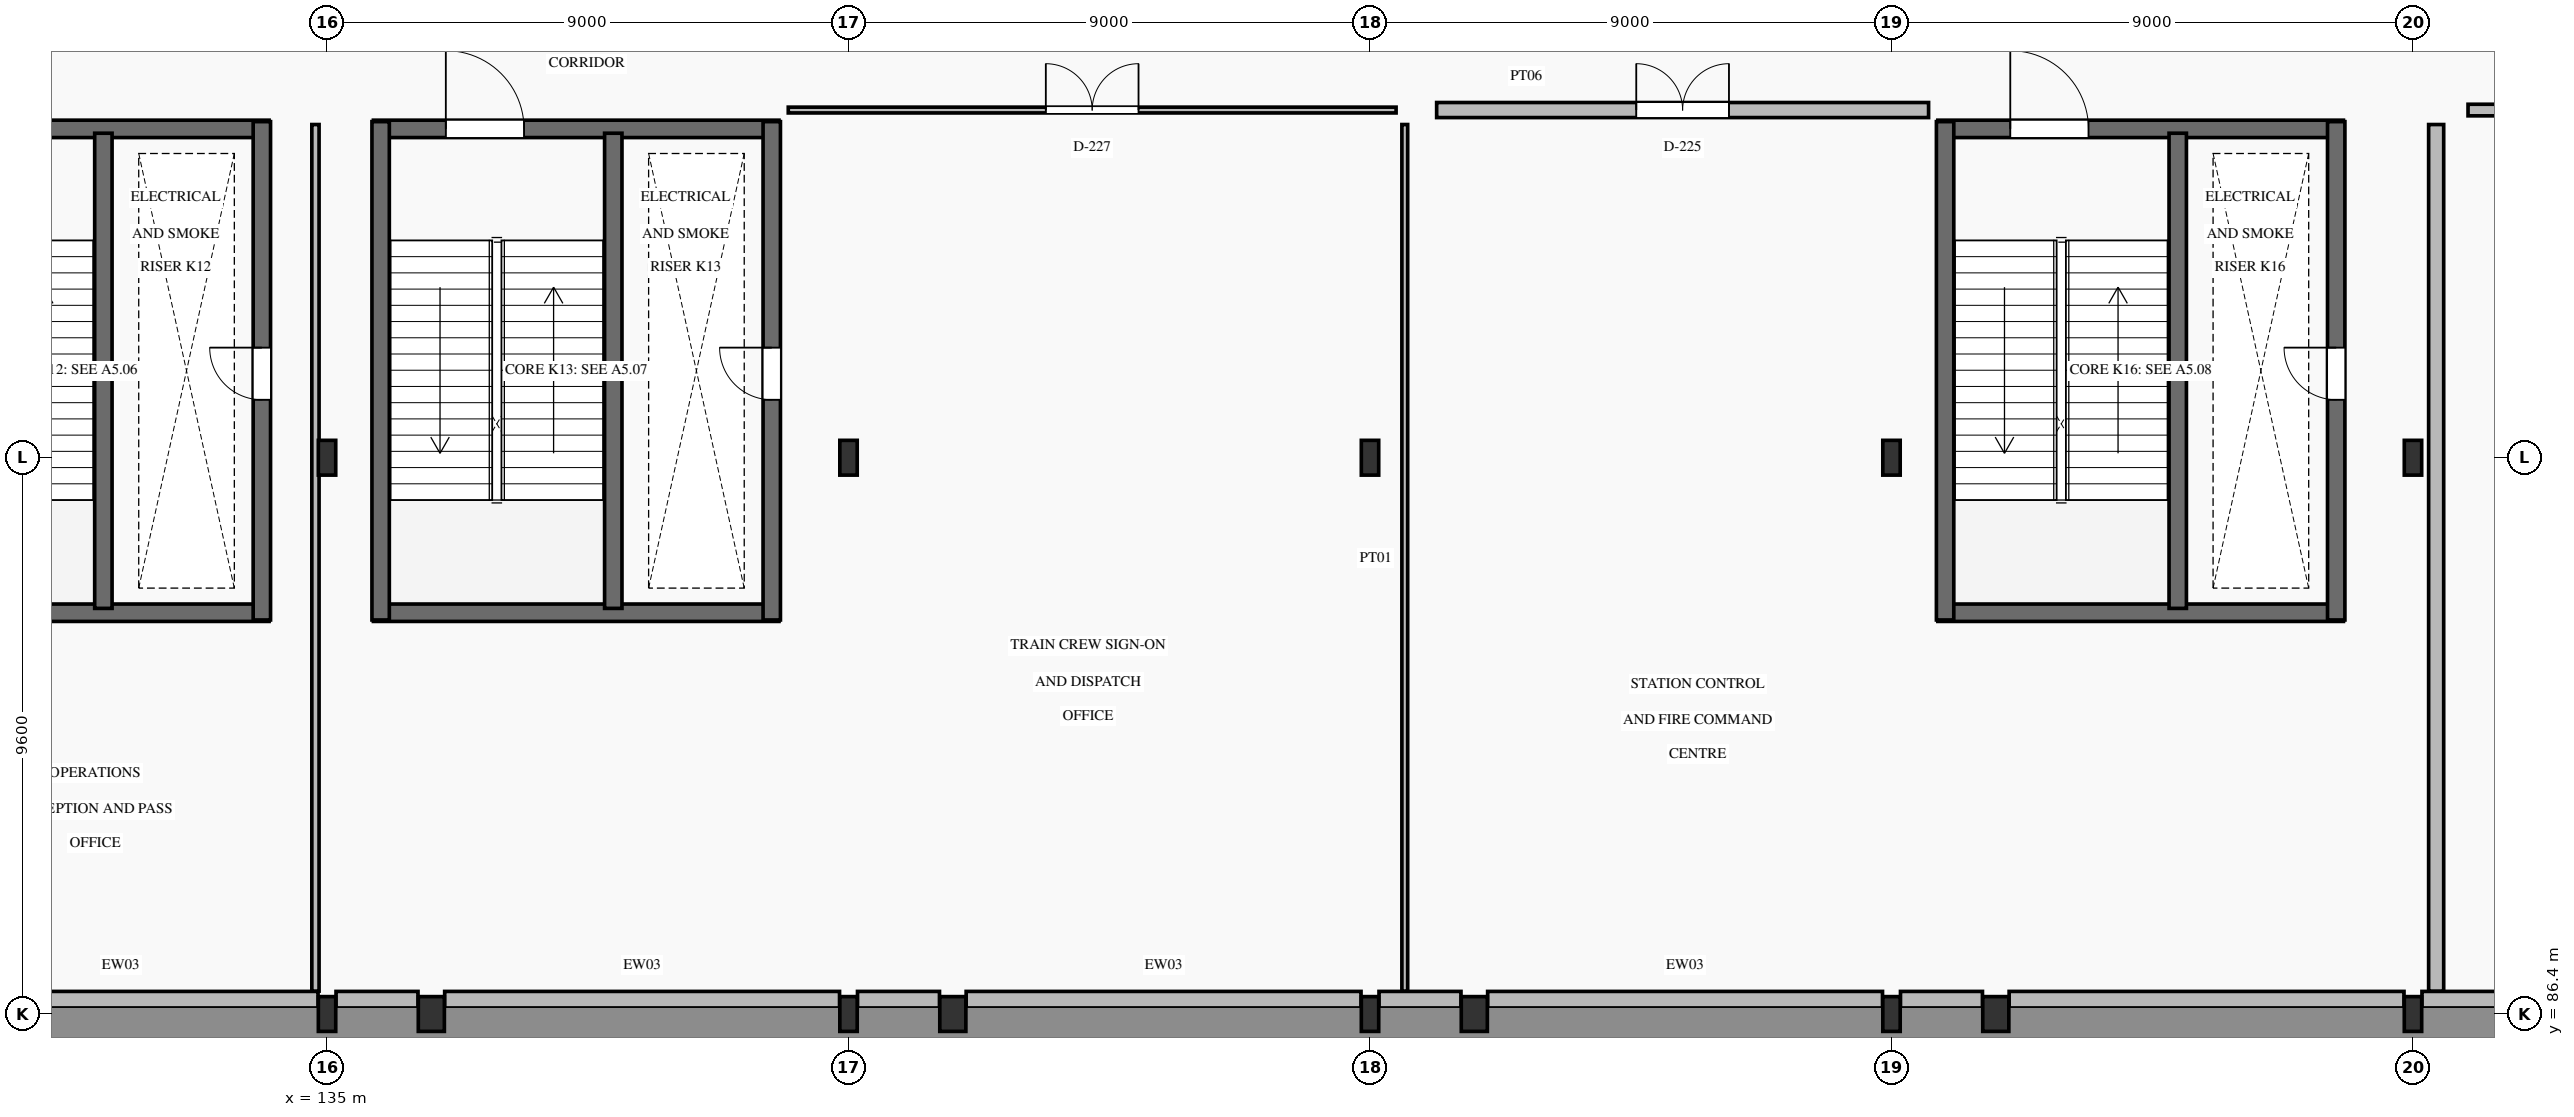
"""IFC4 building model, lengths in metres.
Left out: names, types, materials, properties, quantities, classifications, styles, units other than length and angle.
Written with IfcOpenShell. Run it as: python <this file> out.ifc"""

import sys

from ifc_helpers import new_model, si_unit, direction, frame, frame_2d, origin, origin_2d, place, context, subcontext, project, spatial, rectangle, i_section, extrude, element, fill, save


model = new_model("IFC4")
c1 = context("Model", 3, precision=1e-05, world=origin(), true_north=direction((0.0, 1.0)))
c2 = subcontext(c1, "Body", "Model", "MODEL_VIEW")
j1 = project(units=[si_unit("LENGTHUNIT", "METRE"), si_unit("PLANEANGLEUNIT", "RADIAN")], contexts=[c1])
p1 = place(None, origin())
s1 = spatial("IfcSite", under=j1, at=p1, CompositionType="ELEMENT")
p2 = place(p1, origin())
s2 = spatial("IfcBuilding", under=s1, at=p2, CompositionType="ELEMENT")
p3 = place(p2, origin())
s3 = spatial("IfcBuildingStorey", under=s2, at=p3, CompositionType="ELEMENT", Elevation=0.0)
for number, where, z_axis, x_axis in (
    (1, (135.0, 86.4, 0.0), (0.0, 0.0, 1.0), (1.0, 0.0, 0.0)),
    (2, (135.0, 96.0, 0.0), (0.0, 0.0, 1.0), (1.0, 0.0, 0.0)),
    (3, (144.0, 86.4, 0.0), (0.0, 0.0, 1.0), (1.0, 0.0, 0.0)),
    (4, (144.0, 96.0, 0.0), (0.0, 0.0, 1.0), (1.0, 0.0, 0.0)),
    (5, (153.0, 86.4, 0.0), (0.0, 0.0, 1.0), (1.0, 0.0, 0.0)),
    (6, (153.0, 96.0, 0.0), (0.0, 0.0, 1.0), (1.0, 0.0, 0.0)),
    (7, (162.0, 86.4, 0.0), (0.0, 0.0, 1.0), (1.0, 0.0, 0.0)),
    (8, (162.0, 96.0, 0.0), (0.0, 0.0, 1.0), (1.0, 0.0, 0.0)),
    (9, (171.0, 86.4, 0.0), (0.0, 0.0, 1.0), (1.0, 0.0, 0.0)),
    (10, (171.0, 96.0, 0.0), (0.0, 0.0, 1.0), (1.0, 0.0, 0.0)),
):
    element("IfcColumn", number, at=place(p3, frame(where, z_axis=z_axis, x_axis=x_axis)), inside=s3, PredefinedType="COLUMN", context=c2, shape_type="SweptSolid", body=[
        extrude(i_section(OverallWidth=0.3, OverallDepth=0.6, WebThickness=0.015, FlangeThickness=0.03, FilletRadius=0.027, at=origin_2d()), origin(), (0.0, 0.0, 1.0), 6.0),
    ])
for number, where, z_axis, x_axis in (
    (11, (136.8, 86.4, 0.0), (0.0, 0.0, 1.0), (1.0, 0.0, 0.0)),
    (12, (145.8, 86.4, 0.0), (0.0, 0.0, 1.0), (1.0, 0.0, 0.0)),
    (13, (154.8, 86.4, 0.0), (0.0, 0.0, 1.0), (1.0, 0.0, 0.0)),
    (14, (163.8, 86.4, 0.0), (0.0, 0.0, 1.0), (1.0, 0.0, 0.0)),
):
    element("IfcColumn", number, at=place(p3, frame(where, z_axis=z_axis, x_axis=x_axis)), inside=s3, PredefinedType="PILASTER", context=c2, shape_type="SweptSolid", body=[
        extrude(rectangle(XDim=0.45, YDim=0.6, at=origin_2d()), origin(), (0.0, 0.0, 1.0), 6.0),
    ])
p4 = place(p3, frame((128.03, 86.6, 0.0), z_axis=(0.0, 0.0, 1.0), x_axis=(1.0, 0.0, 0.0)))
e15 = element("IfcWall", 15, at=p4, inside=s3, PredefinedType="SOLIDWALL", context=c2, shape_type="SweptSolid", body=[
    extrude(rectangle(XDim=6.815, YDim=0.38, at=frame_2d((3.407, 0.0))), origin(), (0.0, 0.0, 1.0), 5.49),
])
p5 = place(p3, frame((135.155, 86.6, 0.0), z_axis=(0.0, 0.0, 1.0), x_axis=(1.0, 0.0, 0.0)))
e16 = element("IfcWall", 16, at=p5, inside=s3, PredefinedType="SOLIDWALL", context=c2, shape_type="SweptSolid", body=[
    extrude(rectangle(XDim=1.415, YDim=0.38, at=frame_2d((0.708, 0.0))), origin(), (0.0, 0.0, 1.0), 5.49),
])
p6 = place(p3, frame((137.03, 86.6, 0.0), z_axis=(0.0, 0.0, 1.0), x_axis=(1.0, 0.0, 0.0)))
e17 = element("IfcWall", 17, at=p6, inside=s3, PredefinedType="SOLIDWALL", context=c2, shape_type="SweptSolid", body=[
    extrude(rectangle(XDim=6.815, YDim=0.38, at=frame_2d((3.407, 0.0))), origin(), (0.0, 0.0, 1.0), 5.49),
])
p7 = place(p3, frame((144.155, 86.6, 0.0), z_axis=(0.0, 0.0, 1.0), x_axis=(1.0, 0.0, 0.0)))
e18 = element("IfcWall", 18, at=p7, inside=s3, PredefinedType="SOLIDWALL", context=c2, shape_type="SweptSolid", body=[
    extrude(rectangle(XDim=1.415, YDim=0.38, at=frame_2d((0.708, 0.0))), origin(), (0.0, 0.0, 1.0), 5.49),
])
p8 = place(p3, frame((146.03, 86.6, 0.0), z_axis=(0.0, 0.0, 1.0), x_axis=(1.0, 0.0, 0.0)))
e19 = element("IfcWall", 19, at=p8, inside=s3, PredefinedType="SOLIDWALL", context=c2, shape_type="SweptSolid", body=[
    extrude(rectangle(XDim=6.815, YDim=0.38, at=frame_2d((3.407, 0.0))), origin(), (0.0, 0.0, 1.0), 5.49),
])
p9 = place(p3, frame((153.155, 86.6, 0.0), z_axis=(0.0, 0.0, 1.0), x_axis=(1.0, 0.0, 0.0)))
e20 = element("IfcWall", 20, at=p9, inside=s3, PredefinedType="SOLIDWALL", context=c2, shape_type="SweptSolid", body=[
    extrude(rectangle(XDim=1.415, YDim=0.38, at=frame_2d((0.708, 0.0))), origin(), (0.0, 0.0, 1.0), 5.49),
])
p10 = place(p3, frame((155.03, 86.6, 0.0), z_axis=(0.0, 0.0, 1.0), x_axis=(1.0, 0.0, 0.0)))
e21 = element("IfcWall", 21, at=p10, inside=s3, PredefinedType="SOLIDWALL", context=c2, shape_type="SweptSolid", body=[
    extrude(rectangle(XDim=6.815, YDim=0.38, at=frame_2d((3.407, 0.0))), origin(), (0.0, 0.0, 1.0), 5.49),
])
p11 = place(p3, frame((162.155, 86.6, 0.0), z_axis=(0.0, 0.0, 1.0), x_axis=(1.0, 0.0, 0.0)))
e22 = element("IfcWall", 22, at=p11, inside=s3, PredefinedType="SOLIDWALL", context=c2, shape_type="SweptSolid", body=[
    extrude(rectangle(XDim=1.415, YDim=0.38, at=frame_2d((0.708, 0.0))), origin(), (0.0, 0.0, 1.0), 5.49),
])
p12 = place(p3, frame((164.03, 86.6, 0.0), z_axis=(0.0, 0.0, 1.0), x_axis=(1.0, 0.0, 0.0)))
e23 = element("IfcWall", 23, at=p12, inside=s3, PredefinedType="SOLIDWALL", context=c2, shape_type="SweptSolid", body=[
    extrude(rectangle(XDim=6.815, YDim=0.38, at=frame_2d((3.407, 0.0))), origin(), (0.0, 0.0, 1.0), 5.49),
])
p13 = place(p3, frame((171.155, 86.6, 0.0), z_axis=(0.0, 0.0, 1.0), x_axis=(1.0, 0.0, 0.0)))
e24 = element("IfcWall", 24, at=p13, inside=s3, PredefinedType="SOLIDWALL", context=c2, shape_type="SweptSolid", body=[
    extrude(rectangle(XDim=1.415, YDim=0.38, at=frame_2d((0.708, 0.0))), origin(), (0.0, 0.0, 1.0), 5.49),
])
p14 = place(p3, frame((127.0, 93.325, 0.0), z_axis=(0.0, 0.0, 1.0), x_axis=(1.0, 0.0, 0.0)))
e25 = element("IfcWall", 25, at=p14, inside=s3, PredefinedType="SHEAR", context=c2, shape_type="SweptSolid", body=[
    extrude(rectangle(XDim=7.0, YDim=0.3, at=frame_2d((3.5, 0.0))), origin(), (0.0, 0.0, 1.0), 6.0),
])
p15 = place(p3, frame((127.0, 101.675, 0.0), z_axis=(0.0, 0.0, 1.0), x_axis=(1.0, 0.0, 0.0)))
e26 = element("IfcWall", 26, at=p15, inside=s3, PredefinedType="SHEAR", context=c2, shape_type="SweptSolid", body=[
    extrude(rectangle(XDim=7.0, YDim=0.3, at=frame_2d((3.5, 0.0))), origin(), (0.0, 0.0, 1.0), 6.0),
])
p16 = place(p15, frame((1.25, 0.0, 0.0)))
e27 = element("IfcOpeningElement", 27, at=p16, cuts=e26, PredefinedType="OPENING", context=c2, shape_type="SweptSolid", body=[
    extrude(rectangle(XDim=1.35, YDim=2.2, at=frame_2d((0.675, 1.1))), frame((0.0, 0.165, 0.0), z_axis=(0.0, -1.0, 0.0), x_axis=(1.0, 0.0, 0.0)), (0.0, 0.0, 1.0), 0.33),
])
p17 = place(p3, frame((133.875, 93.2, 0.0), z_axis=(0.0, 0.0, 1.0), x_axis=(0.0, 1.0, 0.0)))
e28 = element("IfcWall", 28, at=p17, inside=s3, PredefinedType="SHEAR", context=c2, shape_type="SweptSolid", body=[
    extrude(rectangle(XDim=8.6, YDim=0.3, at=frame_2d((4.3, 0.0))), origin(), (0.0, 0.0, 1.0), 6.0),
])
p18 = place(p17, frame((3.8, 0.0, 0.0)))
e29 = element("IfcOpeningElement", 29, at=p18, cuts=e28, PredefinedType="OPENING", context=c2, shape_type="SweptSolid", body=[
    extrude(rectangle(XDim=0.9, YDim=2.05, at=frame_2d((0.45, 1.025))), frame((0.0, 0.165, 0.0), z_axis=(0.0, -1.0, 0.0), x_axis=(1.0, 0.0, 0.0)), (0.0, 0.0, 1.0), 0.33),
])
p19 = place(p3, frame((131.14, 93.4, 0.0), z_axis=(0.0, 0.0, 1.0), x_axis=(0.0, 1.0, 0.0)))
e30 = element("IfcWall", 30, at=p19, inside=s3, PredefinedType="SHEAR", context=c2, shape_type="SweptSolid", body=[
    extrude(rectangle(XDim=8.2, YDim=0.3, at=frame_2d((4.1, 0.0))), origin(), (0.0, 0.0, 1.0), 6.0),
])
p20 = place(p3, frame((135.8, 93.325, 0.0), z_axis=(0.0, 0.0, 1.0), x_axis=(1.0, 0.0, 0.0)))
e31 = element("IfcWall", 31, at=p20, inside=s3, PredefinedType="SHEAR", context=c2, shape_type="SweptSolid", body=[
    extrude(rectangle(XDim=7.0, YDim=0.3, at=frame_2d((3.5, 0.0))), origin(), (0.0, 0.0, 1.0), 6.0),
])
p21 = place(p3, frame((135.8, 101.675, 0.0), z_axis=(0.0, 0.0, 1.0), x_axis=(1.0, 0.0, 0.0)))
e32 = element("IfcWall", 32, at=p21, inside=s3, PredefinedType="SHEAR", context=c2, shape_type="SweptSolid", body=[
    extrude(rectangle(XDim=7.0, YDim=0.3, at=frame_2d((3.5, 0.0))), origin(), (0.0, 0.0, 1.0), 6.0),
])
p22 = place(p21, frame((1.25, 0.0, 0.0)))
e33 = element("IfcOpeningElement", 33, at=p22, cuts=e32, PredefinedType="OPENING", context=c2, shape_type="SweptSolid", body=[
    extrude(rectangle(XDim=1.35, YDim=2.2, at=frame_2d((0.675, 1.1))), frame((0.0, 0.165, 0.0), z_axis=(0.0, -1.0, 0.0), x_axis=(1.0, 0.0, 0.0)), (0.0, 0.0, 1.0), 0.33),
])
p23 = place(p3, frame((135.925, 93.2, 0.0), z_axis=(0.0, 0.0, 1.0), x_axis=(0.0, 1.0, 0.0)))
e34 = element("IfcWall", 34, at=p23, inside=s3, PredefinedType="SHEAR", context=c2, shape_type="SweptSolid", body=[
    extrude(rectangle(XDim=8.6, YDim=0.3, at=frame_2d((4.3, 0.0))), origin(), (0.0, 0.0, 1.0), 6.0),
])
p24 = place(p3, frame((142.675, 93.2, 0.0), z_axis=(0.0, 0.0, 1.0), x_axis=(0.0, 1.0, 0.0)))
e35 = element("IfcWall", 35, at=p24, inside=s3, PredefinedType="SHEAR", context=c2, shape_type="SweptSolid", body=[
    extrude(rectangle(XDim=8.6, YDim=0.3, at=frame_2d((4.3, 0.0))), origin(), (0.0, 0.0, 1.0), 6.0),
])
p25 = place(p24, frame((3.8, 0.0, 0.0)))
e36 = element("IfcOpeningElement", 36, at=p25, cuts=e35, PredefinedType="OPENING", context=c2, shape_type="SweptSolid", body=[
    extrude(rectangle(XDim=0.9, YDim=2.05, at=frame_2d((0.45, 1.025))), frame((0.0, 0.165, 0.0), z_axis=(0.0, -1.0, 0.0), x_axis=(1.0, 0.0, 0.0)), (0.0, 0.0, 1.0), 0.33),
])
p26 = place(p3, frame((139.94, 93.4, 0.0), z_axis=(0.0, 0.0, 1.0), x_axis=(0.0, 1.0, 0.0)))
e37 = element("IfcWall", 37, at=p26, inside=s3, PredefinedType="SHEAR", context=c2, shape_type="SweptSolid", body=[
    extrude(rectangle(XDim=8.2, YDim=0.3, at=frame_2d((4.1, 0.0))), origin(), (0.0, 0.0, 1.0), 6.0),
])
p27 = place(p3, frame((162.8, 93.325, 0.0), z_axis=(0.0, 0.0, 1.0), x_axis=(1.0, 0.0, 0.0)))
e38 = element("IfcWall", 38, at=p27, inside=s3, PredefinedType="SHEAR", context=c2, shape_type="SweptSolid", body=[
    extrude(rectangle(XDim=7.0, YDim=0.3, at=frame_2d((3.5, 0.0))), origin(), (0.0, 0.0, 1.0), 6.0),
])
p28 = place(p3, frame((162.8, 101.675, 0.0), z_axis=(0.0, 0.0, 1.0), x_axis=(1.0, 0.0, 0.0)))
e39 = element("IfcWall", 39, at=p28, inside=s3, PredefinedType="SHEAR", context=c2, shape_type="SweptSolid", body=[
    extrude(rectangle(XDim=7.0, YDim=0.3, at=frame_2d((3.5, 0.0))), origin(), (0.0, 0.0, 1.0), 6.0),
])
p29 = place(p28, frame((1.25, 0.0, 0.0)))
e40 = element("IfcOpeningElement", 40, at=p29, cuts=e39, PredefinedType="OPENING", context=c2, shape_type="SweptSolid", body=[
    extrude(rectangle(XDim=1.35, YDim=2.2, at=frame_2d((0.675, 1.1))), frame((0.0, 0.165, 0.0), z_axis=(0.0, -1.0, 0.0), x_axis=(1.0, 0.0, 0.0)), (0.0, 0.0, 1.0), 0.33),
])
p30 = place(p3, frame((162.925, 93.2, 0.0), z_axis=(0.0, 0.0, 1.0), x_axis=(0.0, 1.0, 0.0)))
e41 = element("IfcWall", 41, at=p30, inside=s3, PredefinedType="SHEAR", context=c2, shape_type="SweptSolid", body=[
    extrude(rectangle(XDim=8.6, YDim=0.3, at=frame_2d((4.3, 0.0))), origin(), (0.0, 0.0, 1.0), 6.0),
])
p31 = place(p3, frame((169.675, 93.2, 0.0), z_axis=(0.0, 0.0, 1.0), x_axis=(0.0, 1.0, 0.0)))
e42 = element("IfcWall", 42, at=p31, inside=s3, PredefinedType="SHEAR", context=c2, shape_type="SweptSolid", body=[
    extrude(rectangle(XDim=8.6, YDim=0.3, at=frame_2d((4.3, 0.0))), origin(), (0.0, 0.0, 1.0), 6.0),
])
p32 = place(p31, frame((3.8, 0.0, 0.0)))
e43 = element("IfcOpeningElement", 43, at=p32, cuts=e42, PredefinedType="OPENING", context=c2, shape_type="SweptSolid", body=[
    extrude(rectangle(XDim=0.9, YDim=2.05, at=frame_2d((0.45, 1.025))), frame((0.0, 0.165, 0.0), z_axis=(0.0, -1.0, 0.0), x_axis=(1.0, 0.0, 0.0)), (0.0, 0.0, 1.0), 0.33),
])
p33 = place(p3, frame((166.94, 93.4, 0.0), z_axis=(0.0, 0.0, 1.0), x_axis=(0.0, 1.0, 0.0)))
e44 = element("IfcWall", 44, at=p33, inside=s3, PredefinedType="SHEAR", context=c2, shape_type="SweptSolid", body=[
    extrude(rectangle(XDim=8.2, YDim=0.3, at=frame_2d((4.1, 0.0))), origin(), (0.0, 0.0, 1.0), 6.0),
])
p34 = place(p3, frame((154.15, 102.0, 0.0), z_axis=(0.0, 0.0, 1.0), x_axis=(1.0, 0.0, 0.0)))
e45 = element("IfcWall", 45, at=p34, inside=s3, PredefinedType="PARTITIONING", context=c2, shape_type="SweptSolid", body=[
    extrude(rectangle(XDim=8.49, YDim=0.26, at=frame_2d((4.245, 0.0))), origin(), (0.0, 0.0, 1.0), 5.72),
])
p35 = place(p34, frame((3.445, 0.0, 0.0)))
e46 = element("IfcOpeningElement", 46, at=p35, cuts=e45, PredefinedType="OPENING", context=c2, shape_type="SweptSolid", body=[
    extrude(rectangle(XDim=1.6, YDim=2.25, at=frame_2d((0.8, 1.125))), frame((0.0, 0.145, 0.0), z_axis=(0.0, -1.0, 0.0), x_axis=(1.0, 0.0, 0.0)), (0.0, 0.0, 1.0), 0.29),
])
p36 = place(p3, frame((171.95, 102.0, 0.0), z_axis=(0.0, 0.0, 1.0), x_axis=(1.0, 0.0, 0.0)))
e47 = element("IfcWall", 47, at=p36, inside=s3, PredefinedType="PARTITIONING", context=c2, shape_type="SweptSolid", body=[
    extrude(rectangle(XDim=16.3, YDim=0.2, at=frame_2d((8.15, 0.0))), origin(), (0.0, 0.0, 1.0), 5.72),
])
p37 = place(p36, frame((7.35, 0.0, 0.0)))
e48 = element("IfcOpeningElement", 48, at=p37, cuts=e47, PredefinedType="OPENING", context=c2, shape_type="SweptSolid", body=[
    extrude(rectangle(XDim=1.6, YDim=2.25, at=frame_2d((0.8, 1.125))), frame((0.0, 0.115, 0.0), z_axis=(0.0, -1.0, 0.0), x_axis=(1.0, 0.0, 0.0)), (0.0, 0.0, 1.0), 0.23),
])
p38 = place(p3, frame((142.96, 102.0, 0.0), z_axis=(0.0, 0.0, 1.0), x_axis=(1.0, 0.0, 0.0)))
e49 = element("IfcWall", 49, at=p38, inside=s3, PredefinedType="PARTITIONING", context=c2, shape_type="SweptSolid", body=[
    extrude(rectangle(XDim=10.49, YDim=0.1, at=frame_2d((5.245, 0.0))), origin(), (0.0, 0.0, 1.0), 5.72),
])
p39 = place(p38, frame((4.445, 0.0, 0.0)))
e50 = element("IfcOpeningElement", 50, at=p39, cuts=e49, PredefinedType="OPENING", context=c2, shape_type="SweptSolid", body=[
    extrude(rectangle(XDim=1.6, YDim=2.25, at=frame_2d((0.8, 1.125))), frame((0.0, 0.065, 0.0), z_axis=(0.0, -1.0, 0.0), x_axis=(1.0, 0.0, 0.0)), (0.0, 0.0, 1.0), 0.13),
])
p40 = place(p3, frame((171.4, 86.795, 0.0), z_axis=(0.0, 0.0, 1.0), x_axis=(0.0, 1.0, 0.0)))
e51 = element("IfcWall", 51, at=p40, inside=s3, PredefinedType="PARTITIONING", context=c2, shape_type="SweptSolid", body=[
    extrude(rectangle(XDim=14.955, YDim=0.26, at=frame_2d((7.478, 0.0))), origin(), (0.0, 0.0, 1.0), 5.72),
])
p41 = place(p3, frame((153.6, 86.795, 0.0), z_axis=(0.0, 0.0, 1.0), x_axis=(0.0, 1.0, 0.0)))
e52 = element("IfcWall", 52, at=p41, inside=s3, PredefinedType="PARTITIONING", context=c2, shape_type="SweptSolid", body=[
    extrude(rectangle(XDim=14.955, YDim=0.1, at=frame_2d((7.478, 0.0))), origin(), (0.0, 0.0, 1.0), 5.72),
])
p42 = place(p3, frame((134.8, 86.795, 0.0), z_axis=(0.0, 0.0, 1.0), x_axis=(0.0, 1.0, 0.0)))
e53 = element("IfcWall", 53, at=p42, inside=s3, PredefinedType="PARTITIONING", context=c2, shape_type="SweptSolid", body=[
    extrude(rectangle(XDim=14.955, YDim=0.125, at=frame_2d((7.478, 0.0))), origin(), (0.0, 0.0, 1.0), 5.13),
])
p43 = place(p18, origin())
e54 = element("IfcDoor", 54, at=p43, inside=s3, OperationType="SINGLE_SWING_RIGHT", PredefinedType="DOOR", context=c2, shape_type="SweptSolid", body=[
    extrude(rectangle(XDim=0.9, YDim=2.05, at=frame_2d((0.45, 1.025))), frame((0.0, 0.025, 0.0), z_axis=(0.0, -1.0, 0.0), x_axis=(1.0, 0.0, 0.0)), (0.0, 0.0, 1.0), 0.05),
])
fill(e29, e54)
p44 = place(p22, origin())
e55 = element("IfcDoor", 55, at=p44, inside=s3, OperationType="SINGLE_SWING_LEFT", PredefinedType="DOOR", context=c2, shape_type="SweptSolid", body=[
    extrude(rectangle(XDim=1.35, YDim=2.2, at=frame_2d((0.675, 1.1))), frame((0.0, 0.025, 0.0), z_axis=(0.0, -1.0, 0.0), x_axis=(1.0, 0.0, 0.0)), (0.0, 0.0, 1.0), 0.05),
])
fill(e33, e55)
p45 = place(p25, origin())
e56 = element("IfcDoor", 56, at=p45, inside=s3, OperationType="SINGLE_SWING_RIGHT", PredefinedType="DOOR", context=c2, shape_type="SweptSolid", body=[
    extrude(rectangle(XDim=0.9, YDim=2.05, at=frame_2d((0.45, 1.025))), frame((0.0, 0.025, 0.0), z_axis=(0.0, -1.0, 0.0), x_axis=(1.0, 0.0, 0.0)), (0.0, 0.0, 1.0), 0.05),
])
fill(e36, e56)
p46 = place(p29, origin())
e57 = element("IfcDoor", 57, at=p46, inside=s3, OperationType="SINGLE_SWING_LEFT", PredefinedType="DOOR", context=c2, shape_type="SweptSolid", body=[
    extrude(rectangle(XDim=1.35, YDim=2.2, at=frame_2d((0.675, 1.1))), frame((0.0, 0.025, 0.0), z_axis=(0.0, -1.0, 0.0), x_axis=(1.0, 0.0, 0.0)), (0.0, 0.0, 1.0), 0.05),
])
fill(e40, e57)
p47 = place(p32, origin())
e58 = element("IfcDoor", 58, at=p47, inside=s3, OperationType="SINGLE_SWING_RIGHT", PredefinedType="DOOR", context=c2, shape_type="SweptSolid", body=[
    extrude(rectangle(XDim=0.9, YDim=2.05, at=frame_2d((0.45, 1.025))), frame((0.0, 0.025, 0.0), z_axis=(0.0, -1.0, 0.0), x_axis=(1.0, 0.0, 0.0)), (0.0, 0.0, 1.0), 0.05),
])
fill(e43, e58)
p48 = place(p35, origin())
e59 = element("IfcDoor", 59, at=p48, inside=s3, OperationType="DOUBLE_DOOR_SINGLE_SWING", PredefinedType="DOOR", context=c2, shape_type="SweptSolid", body=[
    extrude(rectangle(XDim=1.6, YDim=2.25, at=frame_2d((0.8, 1.125))), frame((0.0, 0.025, 0.0), z_axis=(0.0, -1.0, 0.0), x_axis=(1.0, 0.0, 0.0)), (0.0, 0.0, 1.0), 0.05),
])
fill(e46, e59)
p49 = place(p39, origin())
e60 = element("IfcDoor", 60, at=p49, inside=s3, OperationType="DOUBLE_DOOR_SINGLE_SWING", PredefinedType="DOOR", context=c2, shape_type="SweptSolid", body=[
    extrude(rectangle(XDim=1.6, YDim=2.25, at=frame_2d((0.8, 1.125))), frame((0.0, 0.025, 0.0), z_axis=(0.0, -1.0, 0.0), x_axis=(1.0, 0.0, 0.0)), (0.0, 0.0, 1.0), 0.05),
])
fill(e50, e60)
save(model, sys.argv[1])
